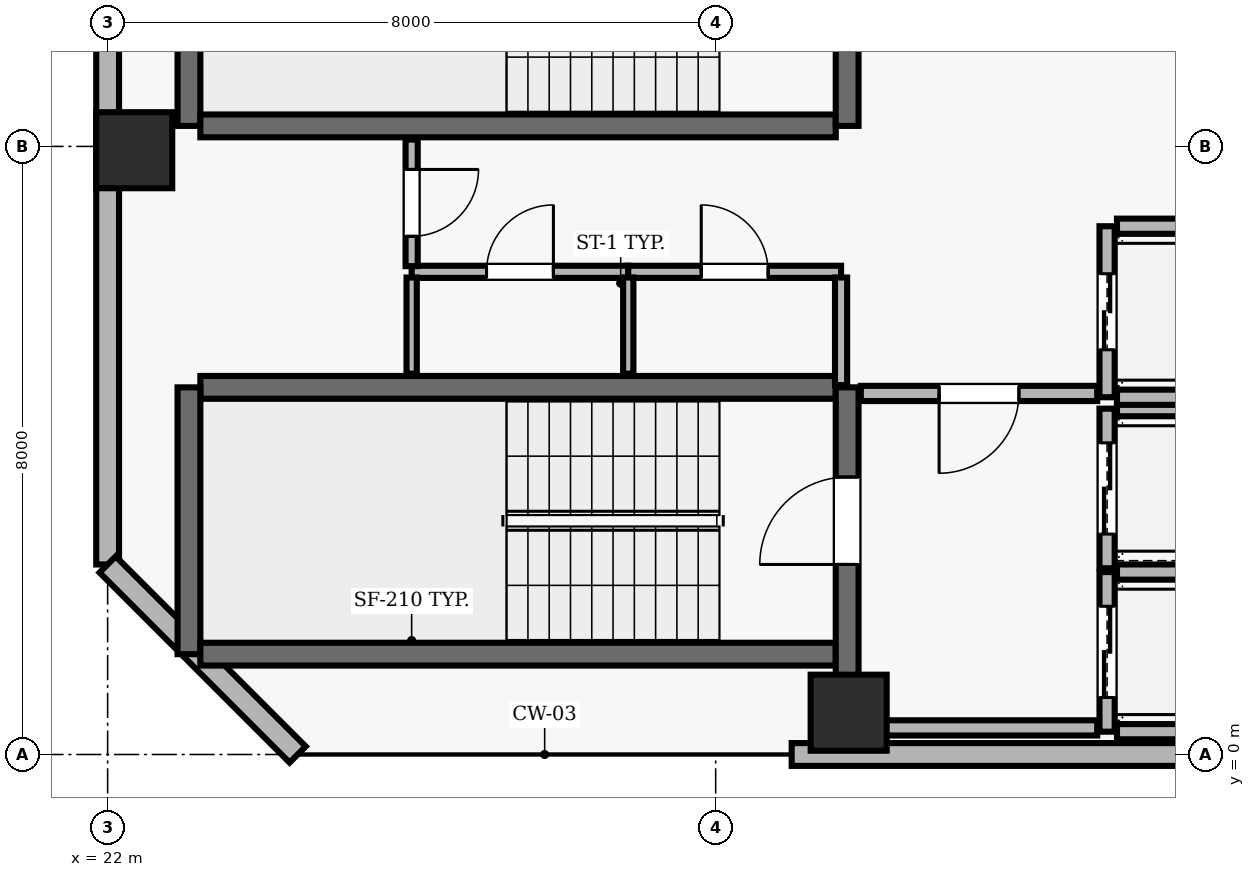
"""IFC4 building model, lengths in metres.
Left out: names, types, materials, properties, quantities, classifications, styles, units other than length and angle.
Written with IfcOpenShell. Run it as: python <this file> out.ifc"""

import sys

from ifc_helpers import new_model, si_unit, direction, frame, frame_2d, origin, origin_2d, place, context, subcontext, project, spatial, rectangle, extrude, element, fill, save


model = new_model("IFC4")
c1 = context("Model", 3, precision=1e-05, world=origin(), true_north=direction((0.0, 1.0)))
c2 = subcontext(c1, "Body", "Model", "MODEL_VIEW")
j1 = project(units=[si_unit("LENGTHUNIT", "METRE"), si_unit("PLANEANGLEUNIT", "RADIAN")], contexts=[c1])
p1 = place(None, origin())
s1 = spatial("IfcSite", under=j1, at=p1, CompositionType="ELEMENT")
p2 = place(p1, origin())
s2 = spatial("IfcBuilding", under=s1, at=p2, CompositionType="ELEMENT")
p3 = place(p2, frame((0.0, 0.0, 207.0)))
s3 = spatial("IfcBuildingStorey", under=s2, at=p3, CompositionType="ELEMENT", Elevation=207.0)
for number, where, z_axis, x_axis in (
    (1, (31.75, 0.55, 0.0), (0.0, 0.0, 1.0), (1.0, 0.0, 0.0)),
    (2, (22.35, 7.95, 0.0), (0.0, 0.0, 1.0), (1.0, 0.0, 0.0)),
):
    element("IfcColumn", number, at=place(p3, frame(where, z_axis=z_axis, x_axis=x_axis)), inside=s3, PredefinedType="COLUMN", context=c2, shape_type="SweptSolid", body=[
        extrude(rectangle(XDim=1.0, YDim=1.0, at=origin_2d()), origin(), (0.0, 0.0, 1.0), 3.9),
    ])
p4 = place(p3, frame((31.0, 0.0, 0.0), z_axis=(0.0, 0.0, 1.0), x_axis=(1.0, 0.0, 0.0)))
e3 = element("IfcWall", 3, at=p4, inside=s3, PredefinedType="SOLIDWALL", context=c2, shape_type="SweptSolid", body=[
    extrude(rectangle(XDim=7.4, YDim=0.3, at=frame_2d((3.7, 0.0))), origin(), (0.0, 0.0, 1.0), 3.69),
])
p5 = place(p3, frame((22.0, 40.7, 0.0), z_axis=(0.0, 0.0, 1.0), x_axis=(0.0, -1.0, 0.0)))
e4 = element("IfcWall", 4, at=p5, inside=s3, PredefinedType="SOLIDWALL", context=c2, shape_type="SweptSolid", body=[
    extrude(rectangle(XDim=38.2, YDim=0.3, at=frame_2d((19.1, 0.0))), origin(), (0.0, 0.0, 1.0), 3.69),
])
p6 = place(p5, frame((7.8, 0.0, 0.0)))
e5 = element("IfcOpeningElement", 5, at=p6, cuts=e4, PredefinedType="OPENING", context=c2, shape_type="SweptSolid", body=[
    extrude(rectangle(XDim=1.0, YDim=2.2, at=frame_2d((0.5, 1.1))), frame((0.0, 0.16, 0.0), z_axis=(0.0, -1.0, 0.0), x_axis=(1.0, 0.0, 0.0)), (0.0, 0.0, 1.0), 0.32),
])
p7 = place(p5, frame((1.829, 0.0, 0.9)))
e6 = element("IfcOpeningElement", 6, at=p7, cuts=e4, PredefinedType="OPENING", context=c2, shape_type="SweptSolid", body=[
    extrude(rectangle(XDim=1.8, YDim=1.6, at=frame_2d((0.9, 0.8))), frame((0.0, 0.16, 0.0), z_axis=(0.0, -1.0, 0.0), x_axis=(1.0, 0.0, 0.0)), (0.0, 0.0, 1.0), 0.32),
])
p8 = place(p5, frame((12.293, 0.0, 0.9)))
e7 = element("IfcOpeningElement", 7, at=p8, cuts=e4, PredefinedType="OPENING", context=c2, shape_type="SweptSolid", body=[
    extrude(rectangle(XDim=1.8, YDim=1.6, at=frame_2d((0.9, 0.8))), frame((0.0, 0.16, 0.0), z_axis=(0.0, -1.0, 0.0), x_axis=(1.0, 0.0, 0.0)), (0.0, 0.0, 1.0), 0.32),
])
p9 = place(p5, frame((18.2, 0.0, 0.9)))
e8 = element("IfcOpeningElement", 8, at=p9, cuts=e4, PredefinedType="OPENING", context=c2, shape_type="SweptSolid", body=[
    extrude(rectangle(XDim=1.8, YDim=1.6, at=frame_2d((0.9, 0.8))), frame((0.0, 0.16, 0.0), z_axis=(0.0, -1.0, 0.0), x_axis=(1.0, 0.0, 0.0)), (0.0, 0.0, 1.0), 0.32),
])
p10 = place(p5, frame((23.207, 0.0, 0.9)))
e9 = element("IfcOpeningElement", 9, at=p10, cuts=e4, PredefinedType="OPENING", context=c2, shape_type="SweptSolid", body=[
    extrude(rectangle(XDim=1.8, YDim=1.6, at=frame_2d((0.9, 0.8))), frame((0.0, 0.16, 0.0), z_axis=(0.0, -1.0, 0.0), x_axis=(1.0, 0.0, 0.0)), (0.0, 0.0, 1.0), 0.32),
])
p11 = place(p5, frame((29.114, 0.0, 0.9)))
e10 = element("IfcOpeningElement", 10, at=p11, cuts=e4, PredefinedType="OPENING", context=c2, shape_type="SweptSolid", body=[
    extrude(rectangle(XDim=1.8, YDim=1.6, at=frame_2d((0.9, 0.8))), frame((0.0, 0.16, 0.0), z_axis=(0.0, -1.0, 0.0), x_axis=(1.0, 0.0, 0.0)), (0.0, 0.0, 1.0), 0.32),
])
p12 = place(p3, frame((22.0, 2.5, 0.0), z_axis=(0.0, 0.0, 1.0), x_axis=(0.707106781187, -0.707106781187, 0.0)))
e11 = element("IfcWall", 11, at=p12, inside=s3, PredefinedType="SOLIDWALL", context=c2, shape_type="SweptSolid", body=[
    extrude(rectangle(XDim=3.536, YDim=0.3, at=frame_2d((1.768, 0.0))), origin(), (0.0, 0.0, 1.0), 3.69),
])
p13 = place(p3, frame((31.58, 4.83, 0.0), z_axis=(0.0, 0.0, 1.0), x_axis=(-1.0, 0.0, 0.0)))
e12 = element("IfcWall", 12, at=p13, inside=s3, PredefinedType="SHEAR", context=c2, shape_type="SweptSolid", body=[
    extrude(rectangle(XDim=8.36, YDim=0.3, at=frame_2d((4.18, 0.0))), origin(), (0.0, 0.0, 1.0), 3.69),
])
p14 = place(p3, frame((23.07, 4.83, 0.0), z_axis=(0.0, 0.0, 1.0), x_axis=(0.0, -1.0, 0.0)))
e13 = element("IfcWall", 13, at=p14, inside=s3, PredefinedType="SHEAR", context=c2, shape_type="SweptSolid", body=[
    extrude(rectangle(XDim=3.51, YDim=0.3, at=frame_2d((1.755, 0.0))), origin(), (0.0, 0.0, 1.0), 3.69),
])
p15 = place(p3, frame((23.22, 1.32, 0.0), z_axis=(0.0, 0.0, 1.0), x_axis=(1.0, 0.0, 0.0)))
e14 = element("IfcWall", 14, at=p15, inside=s3, PredefinedType="SHEAR", context=c2, shape_type="SweptSolid", body=[
    extrude(rectangle(XDim=8.36, YDim=0.3, at=frame_2d((4.18, 0.0))), origin(), (0.0, 0.0, 1.0), 3.69),
])
p16 = place(p3, frame((31.73, 0.96, 0.0), z_axis=(0.0, 0.0, 1.0), x_axis=(0.0, 1.0, 0.0)))
e15 = element("IfcWall", 15, at=p16, inside=s3, PredefinedType="SHEAR", context=c2, shape_type="SweptSolid", body=[
    extrude(rectangle(XDim=3.87, YDim=0.3, at=frame_2d((1.935, 0.0))), origin(), (0.0, 0.0, 1.0), 3.69),
])
p17 = place(p16, frame((1.54, 0.0, 0.0)))
e16 = element("IfcOpeningElement", 16, at=p17, cuts=e15, PredefinedType="OPENING", context=c2, shape_type="SweptSolid", body=[
    extrude(rectangle(XDim=1.15, YDim=2.15, at=frame_2d((0.575, 1.075))), frame((0.0, 0.16, 0.0), z_axis=(0.0, -1.0, 0.0), x_axis=(1.0, 0.0, 0.0)), (0.0, 0.0, 1.0), 0.32),
])
p18 = place(p3, frame((23.07, 11.78, 0.0), z_axis=(0.0, 0.0, 1.0), x_axis=(0.0, -1.0, 0.0)))
e17 = element("IfcWall", 17, at=p18, inside=s3, PredefinedType="SHEAR", context=c2, shape_type="SweptSolid", body=[
    extrude(rectangle(XDim=3.51, YDim=0.3, at=frame_2d((1.755, 0.0))), origin(), (0.0, 0.0, 1.0), 3.69),
])
p19 = place(p3, frame((23.22, 8.27, 0.0), z_axis=(0.0, 0.0, 1.0), x_axis=(1.0, 0.0, 0.0)))
e18 = element("IfcWall", 18, at=p19, inside=s3, PredefinedType="SHEAR", context=c2, shape_type="SweptSolid", body=[
    extrude(rectangle(XDim=8.36, YDim=0.3, at=frame_2d((4.18, 0.0))), origin(), (0.0, 0.0, 1.0), 3.69),
])
p20 = place(p3, frame((31.73, 8.27, 0.0), z_axis=(0.0, 0.0, 1.0), x_axis=(0.0, 1.0, 0.0)))
e19 = element("IfcWall", 19, at=p20, inside=s3, PredefinedType="SHEAR", context=c2, shape_type="SweptSolid", body=[
    extrude(rectangle(XDim=3.51, YDim=0.3, at=frame_2d((1.755, 0.0))), origin(), (0.0, 0.0, 1.0), 3.69),
])
p21 = place(p20, frame((1.18, 0.0, 0.0)))
e20 = element("IfcOpeningElement", 20, at=p21, cuts=e19, PredefinedType="OPENING", context=c2, shape_type="SweptSolid", body=[
    extrude(rectangle(XDim=1.15, YDim=2.15, at=frame_2d((0.575, 1.075))), frame((0.0, 0.16, 0.0), z_axis=(0.0, -1.0, 0.0), x_axis=(1.0, 0.0, 0.0)), (0.0, 0.0, 1.0), 0.32),
])
p22 = place(p3, frame((35.15, 2.4, 0.0), z_axis=(0.0, 0.0, 1.0), x_axis=(0.0, -1.0, 0.0)))
e21 = element("IfcWall", 21, at=p22, inside=s3, PredefinedType="SOLIDWALL", context=c2, shape_type="SweptSolid", body=[
    extrude(rectangle(XDim=2.1, YDim=0.2, at=frame_2d((1.05, 0.0))), origin(), (0.0, 0.0, 1.0), 3.69),
])
p23 = place(p22, frame((0.45, 0.0, 0.0)))
e22 = element("IfcOpeningElement", 22, at=p23, cuts=e21, PredefinedType="OPENING", context=c2, shape_type="SweptSolid", body=[
    extrude(rectangle(XDim=1.2, YDim=2.15, at=frame_2d((0.6, 1.075))), frame((0.0, 0.11, 0.0), z_axis=(0.0, -1.0, 0.0), x_axis=(1.0, 0.0, 0.0)), (0.0, 0.0, 1.0), 0.22),
])
for number, where, z_axis, x_axis in (
    (23, (35.28, 0.3, 0.0), (0.0, 0.0, 1.0), (1.0, 0.0, 0.0)),
    (24, (37.42, 2.4, 0.0), (0.0, 0.0, 1.0), (-1.0, 0.0, 0.0)),
):
    element("IfcWall", number, at=place(p3, frame(where, z_axis=z_axis, x_axis=x_axis)), inside=s3, PredefinedType="SOLIDWALL", context=c2, shape_type="SweptSolid", body=[
        extrude(rectangle(XDim=2.14, YDim=0.2, at=frame_2d((1.07, 0.0))), origin(), (0.0, 0.0, 1.0), 3.69),
    ])
p24 = place(p3, frame((35.15, 4.55, 0.0), z_axis=(0.0, 0.0, 1.0), x_axis=(0.0, -1.0, 0.0)))
e25 = element("IfcWall", 25, at=p24, inside=s3, PredefinedType="SOLIDWALL", context=c2, shape_type="SweptSolid", body=[
    extrude(rectangle(XDim=2.1, YDim=0.2, at=frame_2d((1.05, 0.0))), origin(), (0.0, 0.0, 1.0), 3.69),
])
p25 = place(p24, frame((0.45, 0.0, 0.0)))
e26 = element("IfcOpeningElement", 26, at=p25, cuts=e25, PredefinedType="OPENING", context=c2, shape_type="SweptSolid", body=[
    extrude(rectangle(XDim=1.2, YDim=2.15, at=frame_2d((0.6, 1.075))), frame((0.0, 0.11, 0.0), z_axis=(0.0, -1.0, 0.0), x_axis=(1.0, 0.0, 0.0)), (0.0, 0.0, 1.0), 0.22),
])
p26 = place(p3, frame((37.42, 4.55, 0.0), z_axis=(0.0, 0.0, 1.0), x_axis=(-1.0, 0.0, 0.0)))
e27 = element("IfcWall", 27, at=p26, inside=s3, PredefinedType="SOLIDWALL", context=c2, shape_type="SweptSolid", body=[
    extrude(rectangle(XDim=2.14, YDim=0.2, at=frame_2d((1.07, 0.0))), origin(), (0.0, 0.0, 1.0), 3.69),
])
p27 = place(p3, frame((35.15, 6.95, 0.0), z_axis=(0.0, 0.0, 1.0), x_axis=(0.0, -1.0, 0.0)))
e28 = element("IfcWall", 28, at=p27, inside=s3, PredefinedType="SOLIDWALL", context=c2, shape_type="SweptSolid", body=[
    extrude(rectangle(XDim=2.25, YDim=0.2, at=frame_2d((1.125, 0.0))), origin(), (0.0, 0.0, 1.0), 3.69),
])
p28 = place(p27, frame((0.625, 0.0, 0.0)))
e29 = element("IfcOpeningElement", 29, at=p28, cuts=e28, PredefinedType="OPENING", context=c2, shape_type="SweptSolid", body=[
    extrude(rectangle(XDim=1.0, YDim=2.1, at=frame_2d((0.5, 1.05))), frame((0.0, 0.11, 0.0), z_axis=(0.0, -1.0, 0.0), x_axis=(1.0, 0.0, 0.0)), (0.0, 0.0, 1.0), 0.22),
])
for number, where, z_axis, x_axis in (
    (30, (35.28, 4.7, 0.0), (0.0, 0.0, 1.0), (1.0, 0.0, 0.0)),
    (31, (37.42, 6.95, 0.0), (0.0, 0.0, 1.0), (-1.0, 0.0, 0.0)),
):
    element("IfcWall", number, at=place(p3, frame(where, z_axis=z_axis, x_axis=x_axis)), inside=s3, PredefinedType="SOLIDWALL", context=c2, shape_type="SweptSolid", body=[
        extrude(rectangle(XDim=2.14, YDim=0.2, at=frame_2d((1.07, 0.0))), origin(), (0.0, 0.0, 1.0), 3.69),
    ])
p29 = place(p3, frame((26.0, 6.35, 0.0), z_axis=(0.0, 0.0, 1.0), x_axis=(1.0, 0.0, 0.0)))
e32 = element("IfcWall", 32, at=p29, inside=s3, PredefinedType="PARTITIONING", context=c2, shape_type="SweptSolid", body=[
    extrude(rectangle(XDim=2.85, YDim=0.16, at=frame_2d((1.425, 0.0))), origin(), (0.0, 0.0, 1.0), 3.69),
])
p30 = place(p29, frame((0.985, 0.0, 0.0)))
e33 = element("IfcOpeningElement", 33, at=p30, cuts=e32, PredefinedType="OPENING", context=c2, shape_type="SweptSolid", body=[
    extrude(rectangle(XDim=0.88, YDim=2.1, at=frame_2d((0.44, 1.05))), frame((0.0, 0.09, 0.0), z_axis=(0.0, -1.0, 0.0), x_axis=(1.0, 0.0, 0.0)), (0.0, 0.0, 1.0), 0.18),
])
p31 = place(p3, frame((28.85, 6.35, 0.0), z_axis=(0.0, 0.0, 1.0), x_axis=(1.0, 0.0, 0.0)))
e34 = element("IfcWall", 34, at=p31, inside=s3, PredefinedType="PARTITIONING", context=c2, shape_type="SweptSolid", body=[
    extrude(rectangle(XDim=2.8, YDim=0.16, at=frame_2d((1.4, 0.0))), origin(), (0.0, 0.0, 1.0), 3.69),
])
p32 = place(p31, frame((0.96, 0.0, 0.0)))
e35 = element("IfcOpeningElement", 35, at=p32, cuts=e34, PredefinedType="OPENING", context=c2, shape_type="SweptSolid", body=[
    extrude(rectangle(XDim=0.88, YDim=2.1, at=frame_2d((0.44, 1.05))), frame((0.0, 0.09, 0.0), z_axis=(0.0, -1.0, 0.0), x_axis=(1.0, 0.0, 0.0)), (0.0, 0.0, 1.0), 0.18),
])
p33 = place(p3, frame((31.65, 0.35, 0.0), z_axis=(0.0, 0.0, 1.0), x_axis=(1.0, 0.0, 0.0)))
e36 = element("IfcWall", 36, at=p33, inside=s3, PredefinedType="SOLIDWALL", context=c2, shape_type="SweptSolid", body=[
    extrude(rectangle(XDim=3.37, YDim=0.2, at=frame_2d((1.685, 0.0))), origin(), (0.0, 0.0, 1.0), 3.69),
])
p34 = place(p3, frame((35.02, 4.75, 0.0), z_axis=(0.0, 0.0, 1.0), x_axis=(-1.0, 0.0, 0.0)))
e37 = element("IfcWall", 37, at=p34, inside=s3, PredefinedType="SOLIDWALL", context=c2, shape_type="SweptSolid", body=[
    extrude(rectangle(XDim=3.11, YDim=0.2, at=frame_2d((1.555, 0.0))), origin(), (0.0, 0.0, 1.0), 3.69),
])
p35 = place(p34, frame((1.03, 0.0, 0.0)))
e38 = element("IfcOpeningElement", 38, at=p35, cuts=e37, PredefinedType="OPENING", context=c2, shape_type="SweptSolid", body=[
    extrude(rectangle(XDim=1.05, YDim=2.15, at=frame_2d((0.525, 1.075))), frame((0.0, 0.11, 0.0), z_axis=(0.0, -1.0, 0.0), x_axis=(1.0, 0.0, 0.0)), (0.0, 0.0, 1.0), 0.22),
])
p36 = place(p3, frame((26.0, 5.01, 0.0), z_axis=(0.0, 0.0, 1.0), x_axis=(0.0, 1.0, 0.0)))
e39 = element("IfcWall", 39, at=p36, inside=s3, PredefinedType="PARTITIONING", context=c2, shape_type="SweptSolid", body=[
    extrude(rectangle(XDim=1.265, YDim=0.135, at=frame_2d((0.632, 0.0))), origin(), (0.0, 0.0, 1.0), 3.69),
])
p37 = place(p3, frame((26.0, 8.09, 0.0), z_axis=(0.0, 0.0, 1.0), x_axis=(0.0, -1.0, 0.0)))
e40 = element("IfcWall", 40, at=p37, inside=s3, PredefinedType="PARTITIONING", context=c2, shape_type="SweptSolid", body=[
    extrude(rectangle(XDim=1.665, YDim=0.16, at=frame_2d((0.833, 0.0))), origin(), (0.0, 0.0, 1.0), 3.69),
])
p38 = place(p37, frame((0.393, 0.0, 0.0)))
e41 = element("IfcOpeningElement", 41, at=p38, cuts=e40, PredefinedType="OPENING", context=c2, shape_type="SweptSolid", body=[
    extrude(rectangle(XDim=0.88, YDim=2.1, at=frame_2d((0.44, 1.05))), frame((0.0, 0.09, 0.0), z_axis=(0.0, -1.0, 0.0), x_axis=(1.0, 0.0, 0.0)), (0.0, 0.0, 1.0), 0.18),
])
p39 = place(p3, frame((28.85, 5.01, 0.0), z_axis=(0.0, 0.0, 1.0), x_axis=(0.0, 1.0, 0.0)))
e42 = element("IfcWall", 42, at=p39, inside=s3, PredefinedType="PARTITIONING", context=c2, shape_type="SweptSolid", body=[
    extrude(rectangle(XDim=1.265, YDim=0.135, at=frame_2d((0.632, 0.0))), origin(), (0.0, 0.0, 1.0), 3.69),
])
p40 = place(p3, frame((31.65, 4.86, 0.0), z_axis=(0.0, 0.0, 1.0), x_axis=(0.0, 1.0, 0.0)))
e43 = element("IfcWall", 43, at=p40, inside=s3, PredefinedType="PARTITIONING", context=c2, shape_type="SweptSolid", body=[
    extrude(rectangle(XDim=1.415, YDim=0.16, at=frame_2d((0.708, 0.0))), origin(), (0.0, 0.0, 1.0), 3.69),
])
p41 = place(p17, origin())
e44 = element("IfcDoor", 44, at=p41, inside=s3, OperationType="SINGLE_SWING_LEFT", PredefinedType="DOOR", context=c2, shape_type="SweptSolid", body=[
    extrude(rectangle(XDim=1.15, YDim=2.15, at=frame_2d((0.575, 1.075))), frame((0.0, 0.025, 0.0), z_axis=(0.0, -1.0, 0.0), x_axis=(1.0, 0.0, 0.0)), (0.0, 0.0, 1.0), 0.05),
])
fill(e16, e44)
p42 = place(p23, origin())
e45 = element("IfcDoor", 45, at=p42, inside=s3, OperationType="DOUBLE_DOOR_SLIDING", PredefinedType="DOOR", context=c2, shape_type="SweptSolid", body=[
    extrude(rectangle(XDim=1.2, YDim=2.15, at=frame_2d((0.6, 1.075))), frame((0.0, 0.025, 0.0), z_axis=(0.0, -1.0, 0.0), x_axis=(1.0, 0.0, 0.0)), (0.0, 0.0, 1.0), 0.05),
])
fill(e22, e45)
p43 = place(p25, origin())
e46 = element("IfcDoor", 46, at=p43, inside=s3, OperationType="DOUBLE_DOOR_SLIDING", PredefinedType="DOOR", context=c2, shape_type="SweptSolid", body=[
    extrude(rectangle(XDim=1.2, YDim=2.15, at=frame_2d((0.6, 1.075))), frame((0.0, 0.025, 0.0), z_axis=(0.0, -1.0, 0.0), x_axis=(1.0, 0.0, 0.0)), (0.0, 0.0, 1.0), 0.05),
])
fill(e26, e46)
p44 = place(p28, origin())
e47 = element("IfcDoor", 47, at=p44, inside=s3, OperationType="DOUBLE_DOOR_SLIDING", PredefinedType="DOOR", context=c2, shape_type="SweptSolid", body=[
    extrude(rectangle(XDim=1.0, YDim=2.1, at=frame_2d((0.5, 1.05))), frame((0.0, 0.025, 0.0), z_axis=(0.0, -1.0, 0.0), x_axis=(1.0, 0.0, 0.0)), (0.0, 0.0, 1.0), 0.05),
])
fill(e29, e47)
p45 = place(p35, origin())
e48 = element("IfcDoor", 48, at=p45, inside=s3, OperationType="SINGLE_SWING_RIGHT", PredefinedType="DOOR", context=c2, shape_type="SweptSolid", body=[
    extrude(rectangle(XDim=1.05, YDim=2.15, at=frame_2d((0.525, 1.075))), frame((0.0, 0.025, 0.0), z_axis=(0.0, -1.0, 0.0), x_axis=(1.0, 0.0, 0.0)), (0.0, 0.0, 1.0), 0.05),
])
fill(e38, e48)
p46 = place(p38, origin())
e49 = element("IfcDoor", 49, at=p46, inside=s3, OperationType="SINGLE_SWING_LEFT", PredefinedType="DOOR", context=c2, shape_type="SweptSolid", body=[
    extrude(rectangle(XDim=0.88, YDim=2.1, at=frame_2d((0.44, 1.05))), frame((0.0, 0.025, 0.0), z_axis=(0.0, -1.0, 0.0), x_axis=(1.0, 0.0, 0.0)), (0.0, 0.0, 1.0), 0.05),
])
fill(e41, e49)
p47 = place(p30, origin())
e50 = element("IfcDoor", 50, at=p47, inside=s3, OperationType="SINGLE_SWING_RIGHT", PredefinedType="DOOR", context=c2, shape_type="SweptSolid", body=[
    extrude(rectangle(XDim=0.88, YDim=2.1, at=frame_2d((0.44, 1.05))), frame((0.0, 0.025, 0.0), z_axis=(0.0, -1.0, 0.0), x_axis=(1.0, 0.0, 0.0)), (0.0, 0.0, 1.0), 0.05),
])
fill(e33, e50)
p48 = place(p32, origin())
e51 = element("IfcDoor", 51, at=p48, inside=s3, OperationType="SINGLE_SWING_LEFT", PredefinedType="DOOR", context=c2, shape_type="SweptSolid", body=[
    extrude(rectangle(XDim=0.88, YDim=2.1, at=frame_2d((0.44, 1.05))), frame((0.0, 0.025, 0.0), z_axis=(0.0, -1.0, 0.0), x_axis=(1.0, 0.0, 0.0)), (0.0, 0.0, 1.0), 0.05),
])
fill(e35, e51)
save(model, sys.argv[1])
